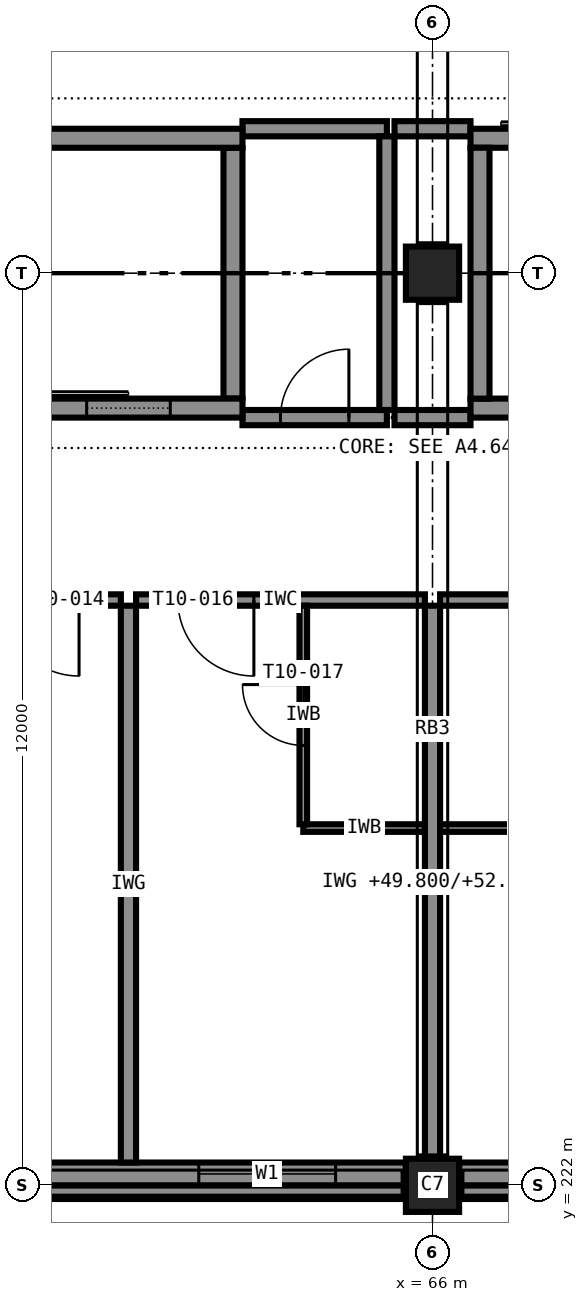
"""IFC4 building model, lengths in metres.
Left out: names, types, materials, properties, quantities, classifications, styles, units other than length and angle.
Written with IfcOpenShell. Run it as: python <this file> out.ifc"""

import sys

from ifc_helpers import new_model, si_unit, direction, frame, frame_2d, origin, origin_2d, place, context, subcontext, project, spatial, rectangle, extrude, element, fill, save


model = new_model("IFC4")
c1 = context("Model", 3, precision=1e-05, world=origin(), true_north=direction((0.0, 1.0)))
c2 = subcontext(c1, "Body", "Model", "MODEL_VIEW")
j1 = project(units=[si_unit("LENGTHUNIT", "METRE"), si_unit("PLANEANGLEUNIT", "RADIAN")], contexts=[c1])
p1 = place(None, origin())
s1 = spatial("IfcSite", under=j1, at=p1, CompositionType="ELEMENT")
p2 = place(p1, origin())
s2 = spatial("IfcBuilding", under=s1, at=p2, CompositionType="ELEMENT")
p3 = place(p2, frame((0.0, 0.0, 49.8)))
s3 = spatial("IfcBuildingStorey", under=s2, at=p3, CompositionType="ELEMENT", Elevation=49.8)
for number, where, z_axis, x_axis in (
    (1, (66.0, 222.0, 0.0), (0.0, 0.0, 1.0), (1.0, 0.0, 0.0)),
    (2, (66.0, 234.0, 0.0), (0.0, 0.0, 1.0), (1.0, 0.0, 0.0)),
):
    element("IfcColumn", number, at=place(p3, frame(where, z_axis=z_axis, x_axis=x_axis)), inside=s3, PredefinedType="COLUMN", context=c2, shape_type="SweptSolid", body=[
        extrude(rectangle(XDim=0.7, YDim=0.7, at=origin_2d()), origin(), (0.0, 0.0, 1.0), 3.6),
    ])
p4 = place(p3, frame((60.5, 232.225, 0.0), z_axis=(0.0, 0.0, 1.0), x_axis=(1.0, 0.0, 0.0)))
e3 = element("IfcWall", 3, at=p4, inside=s3, PredefinedType="SHEAR", context=c2, shape_type="SweptSolid", body=[
    extrude(rectangle(XDim=3.0, YDim=0.25, at=frame_2d((1.5, 0.0))), origin(), (0.0, 0.0, 1.0), 3.6),
])
p5 = place(p4, frame((0.95, 0.0, 0.0)))
e4 = element("IfcOpeningElement", 4, at=p5, cuts=e3, PredefinedType="OPENING", context=c2, shape_type="SweptSolid", body=[
    extrude(rectangle(XDim=1.1, YDim=2.1, at=frame_2d((0.55, 1.05))), frame((0.0, 0.135, 0.0), z_axis=(0.0, -1.0, 0.0), x_axis=(1.0, 0.0, 0.0)), (0.0, 0.0, 1.0), 0.27),
])
p6 = place(p3, frame((60.5, 235.775, 0.0), z_axis=(0.0, 0.0, 1.0), x_axis=(1.0, 0.0, 0.0)))
e5 = element("IfcWall", 5, at=p6, inside=s3, PredefinedType="SHEAR", context=c2, shape_type="SweptSolid", body=[
    extrude(rectangle(XDim=3.0, YDim=0.25, at=frame_2d((1.5, 0.0))), origin(), (0.0, 0.0, 1.0), 3.6),
])
p7 = place(p3, frame((63.375, 232.35, 0.0), z_axis=(0.0, 0.0, 1.0), x_axis=(0.0, 1.0, 0.0)))
e6 = element("IfcWall", 6, at=p7, inside=s3, PredefinedType="SHEAR", context=c2, shape_type="SweptSolid", body=[
    extrude(rectangle(XDim=3.3, YDim=0.25, at=frame_2d((1.65, 0.0))), origin(), (0.0, 0.0, 1.0), 3.6),
])
p8 = place(p3, frame((66.5, 232.225, 0.0), z_axis=(0.0, 0.0, 1.0), x_axis=(1.0, 0.0, 0.0)))
e7 = element("IfcWall", 7, at=p8, inside=s3, PredefinedType="SHEAR", context=c2, shape_type="SweptSolid", body=[
    extrude(rectangle(XDim=3.0, YDim=0.25, at=frame_2d((1.5, 0.0))), origin(), (0.0, 0.0, 1.0), 3.6),
])
p9 = place(p3, frame((66.5, 235.775, 0.0), z_axis=(0.0, 0.0, 1.0), x_axis=(1.0, 0.0, 0.0)))
e8 = element("IfcWall", 8, at=p9, inside=s3, PredefinedType="SHEAR", context=c2, shape_type="SweptSolid", body=[
    extrude(rectangle(XDim=3.0, YDim=0.25, at=frame_2d((1.5, 0.0))), origin(), (0.0, 0.0, 1.0), 3.6),
])
p10 = place(p9, frame((0.95, 0.0, 0.0)))
e9 = element("IfcOpeningElement", 9, at=p10, cuts=e8, PredefinedType="OPENING", context=c2, shape_type="SweptSolid", body=[
    extrude(rectangle(XDim=1.1, YDim=2.1, at=frame_2d((0.55, 1.05))), frame((0.0, 0.135, 0.0), z_axis=(0.0, -1.0, 0.0), x_axis=(1.0, 0.0, 0.0)), (0.0, 0.0, 1.0), 0.27),
])
p11 = place(p3, frame((66.625, 232.35, 0.0), z_axis=(0.0, 0.0, 1.0), x_axis=(0.0, 1.0, 0.0)))
e10 = element("IfcWall", 10, at=p11, inside=s3, PredefinedType="SHEAR", context=c2, shape_type="SweptSolid", body=[
    extrude(rectangle(XDim=3.3, YDim=0.25, at=frame_2d((1.65, 0.0))), origin(), (0.0, 0.0, 1.0), 3.6),
])
p12 = place(p3, frame((54.35, 222.15, 0.0), z_axis=(0.0, 0.0, 1.0), x_axis=(1.0, 0.0, 0.0)))
e11 = element("IfcWall", 11, at=p12, inside=s3, PredefinedType="STANDARD", context=c2, shape_type="SweptSolid", body=[
    extrude(rectangle(XDim=11.3, YDim=0.3, at=frame_2d((5.65, 0.0))), origin(), (0.0, 0.0, 1.0), 2.6),
])
p13 = place(p12, frame((0.925, 0.0, 0.85)))
e12 = element("IfcOpeningElement", 12, at=p13, cuts=e11, PredefinedType="OPENING", context=c2, shape_type="SweptSolid", body=[
    extrude(rectangle(XDim=1.8, YDim=1.75, at=frame_2d((0.9, 0.875))), frame((0.0, 0.16, 0.0), z_axis=(0.0, -1.0, 0.0), x_axis=(1.0, 0.0, 0.0)), (0.0, 0.0, 1.0), 0.32),
])
p14 = place(p12, frame((4.75, 0.0, 0.85)))
e13 = element("IfcOpeningElement", 13, at=p14, cuts=e11, PredefinedType="OPENING", context=c2, shape_type="SweptSolid", body=[
    extrude(rectangle(XDim=1.8, YDim=1.75, at=frame_2d((0.9, 0.875))), frame((0.0, 0.16, 0.0), z_axis=(0.0, -1.0, 0.0), x_axis=(1.0, 0.0, 0.0)), (0.0, 0.0, 1.0), 0.32),
])
p15 = place(p12, frame((8.575, 0.0, 0.85)))
e14 = element("IfcOpeningElement", 14, at=p15, cuts=e11, PredefinedType="OPENING", context=c2, shape_type="SweptSolid", body=[
    extrude(rectangle(XDim=1.8, YDim=1.75, at=frame_2d((0.9, 0.875))), frame((0.0, 0.16, 0.0), z_axis=(0.0, -1.0, 0.0), x_axis=(1.0, 0.0, 0.0)), (0.0, 0.0, 1.0), 0.32),
])
p16 = place(p3, frame((66.35, 222.15, 0.0), z_axis=(0.0, 0.0, 1.0), x_axis=(1.0, 0.0, 0.0)))
e15 = element("IfcWall", 15, at=p16, inside=s3, PredefinedType="STANDARD", context=c2, shape_type="SweptSolid", body=[
    extrude(rectangle(XDim=11.3, YDim=0.3, at=frame_2d((5.65, 0.0))), origin(), (0.0, 0.0, 1.0), 2.6),
])
p17 = place(p16, frame((1.925, 0.0, 0.85)))
e16 = element("IfcOpeningElement", 16, at=p17, cuts=e15, PredefinedType="OPENING", context=c2, shape_type="SweptSolid", body=[
    extrude(rectangle(XDim=1.8, YDim=1.75, at=frame_2d((0.9, 0.875))), frame((0.0, 0.16, 0.0), z_axis=(0.0, -1.0, 0.0), x_axis=(1.0, 0.0, 0.0)), (0.0, 0.0, 1.0), 0.32),
])
p18 = place(p16, frame((7.575, 0.0, 0.85)))
e17 = element("IfcOpeningElement", 17, at=p18, cuts=e15, PredefinedType="OPENING", context=c2, shape_type="SweptSolid", body=[
    extrude(rectangle(XDim=1.8, YDim=1.75, at=frame_2d((0.9, 0.875))), frame((0.0, 0.16, 0.0), z_axis=(0.0, -1.0, 0.0), x_axis=(1.0, 0.0, 0.0)), (0.0, 0.0, 1.0), 0.32),
])
for number, where, z_axis, x_axis in (
    (18, (54.35, 221.925, 3.4), (0.0, 0.0, 1.0), (1.0, 0.0, 0.0)),
    (19, (66.35, 221.925, 3.4), (0.0, 0.0, 1.0), (1.0, 0.0, 0.0)),
):
    element("IfcWall", number, at=place(p3, frame(where, z_axis=z_axis, x_axis=x_axis)), inside=s3, PredefinedType="STANDARD", context=c2, shape_type="SweptSolid", body=[
        extrude(rectangle(XDim=11.3, YDim=0.15, at=frame_2d((5.65, 0.0))), origin(), (0.0, 0.0, 1.0), 0.2),
    ])
p19 = place(p3, frame((63.5, 232.1, 0.0), z_axis=(0.0, 0.0, 1.0), x_axis=(1.0, 0.0, 0.0)))
e20 = element("IfcWall", 20, at=p19, inside=s3, PredefinedType="PARTITIONING", context=c2, shape_type="SweptSolid", body=[
    extrude(rectangle(XDim=1.9, YDim=0.2, at=frame_2d((0.95, 0.0))), origin(), (0.0, 0.0, 1.0), 3.4),
])
p20 = place(p19, frame((0.5, 0.0, 0.0)))
e21 = element("IfcOpeningElement", 21, at=p20, cuts=e20, PredefinedType="OPENING", context=c2, shape_type="SweptSolid", body=[
    extrude(rectangle(XDim=0.9, YDim=2.1, at=frame_2d((0.45, 1.05))), frame((0.0, 0.11, 0.0), z_axis=(0.0, -1.0, 0.0), x_axis=(1.0, 0.0, 0.0)), (0.0, 0.0, 1.0), 0.22),
])
p21 = place(p3, frame((65.5, 232.1, 0.0), z_axis=(0.0, 0.0, 1.0), x_axis=(1.0, 0.0, 0.0)))
e22 = element("IfcWall", 22, at=p21, inside=s3, PredefinedType="PARTITIONING", context=c2, shape_type="SweptSolid", body=[
    extrude(rectangle(XDim=1.0, YDim=0.2, at=frame_2d((0.5, 0.0))), origin(), (0.0, 0.0, 1.0), 3.4),
])
p22 = place(p3, frame((63.5, 235.9, 0.0), z_axis=(0.0, 0.0, 1.0), x_axis=(1.0, 0.0, 0.0)))
e23 = element("IfcWall", 23, at=p22, inside=s3, PredefinedType="PARTITIONING", context=c2, shape_type="SweptSolid", body=[
    extrude(rectangle(XDim=1.9, YDim=0.2, at=frame_2d((0.95, 0.0))), origin(), (0.0, 0.0, 1.0), 3.4),
])
p23 = place(p3, frame((65.5, 235.9, 0.0), z_axis=(0.0, 0.0, 1.0), x_axis=(1.0, 0.0, 0.0)))
e24 = element("IfcWall", 24, at=p23, inside=s3, PredefinedType="PARTITIONING", context=c2, shape_type="SweptSolid", body=[
    extrude(rectangle(XDim=1.0, YDim=0.2, at=frame_2d((0.5, 0.0))), origin(), (0.0, 0.0, 1.0), 3.4),
])
p24 = place(p3, frame((65.4, 232.2, 0.0), z_axis=(0.0, 0.0, 1.0), x_axis=(0.0, 1.0, 0.0)))
e25 = element("IfcWall", 25, at=p24, inside=s3, PredefinedType="PARTITIONING", context=c2, shape_type="SweptSolid", body=[
    extrude(rectangle(XDim=3.6, YDim=0.2, at=frame_2d((1.8, 0.0))), origin(), (0.0, 0.0, 1.0), 3.4),
])
p25 = place(p3, frame((61.9, 229.7, 0.0), z_axis=(0.0, 0.0, 1.0), x_axis=(-1.0, 0.0, 0.0)))
e26 = element("IfcWall", 26, at=p25, inside=s3, PredefinedType="PARTITIONING", context=c2, shape_type="SweptSolid", body=[
    extrude(rectangle(XDim=3.8, YDim=0.15, at=frame_2d((1.9, 0.0))), origin(), (0.0, 0.0, 1.0), 3.4),
])
p26 = place(p25, frame((0.55, 0.0, 0.0)))
e27 = element("IfcOpeningElement", 27, at=p26, cuts=e26, PredefinedType="OPENING", context=c2, shape_type="SweptSolid", body=[
    extrude(rectangle(XDim=1.0, YDim=2.1, at=frame_2d((0.5, 1.05))), frame((0.0, 0.085, 0.0), z_axis=(0.0, -1.0, 0.0), x_axis=(1.0, 0.0, 0.0)), (0.0, 0.0, 1.0), 0.17),
])
p27 = place(p3, frame((65.9, 229.7, 0.0), z_axis=(0.0, 0.0, 1.0), x_axis=(-1.0, 0.0, 0.0)))
e28 = element("IfcWall", 28, at=p27, inside=s3, PredefinedType="PARTITIONING", context=c2, shape_type="SweptSolid", body=[
    extrude(rectangle(XDim=3.8, YDim=0.15, at=frame_2d((1.9, 0.0))), origin(), (0.0, 0.0, 1.0), 3.4),
])
p28 = place(p27, frame((2.25, 0.0, 0.0)))
e29 = element("IfcOpeningElement", 29, at=p28, cuts=e28, PredefinedType="OPENING", context=c2, shape_type="SweptSolid", body=[
    extrude(rectangle(XDim=1.0, YDim=2.1, at=frame_2d((0.5, 1.05))), frame((0.0, 0.085, 0.0), z_axis=(0.0, -1.0, 0.0), x_axis=(1.0, 0.0, 0.0)), (0.0, 0.0, 1.0), 0.17),
])
p29 = place(p3, frame((64.3, 226.7, 0.0), z_axis=(0.0, 0.0, 1.0), x_axis=(1.0, 0.0, 0.0)))
e30 = element("IfcWall", 30, at=p29, inside=s3, PredefinedType="PARTITIONING", context=c2, shape_type="SweptSolid", body=[
    extrude(rectangle(XDim=1.6, YDim=0.1, at=frame_2d((0.8, 0.0))), origin(), (0.0, 0.0, 1.0), 3.4),
])
p30 = place(p3, frame((64.3, 226.75, 0.0), z_axis=(0.0, 0.0, 1.0), x_axis=(0.0, 1.0, 0.0)))
e31 = element("IfcWall", 31, at=p30, inside=s3, PredefinedType="PARTITIONING", context=c2, shape_type="SweptSolid", body=[
    extrude(rectangle(XDim=2.875, YDim=0.1, at=frame_2d((1.438, 0.0))), origin(), (0.0, 0.0, 1.0), 3.4),
])
p31 = place(p30, frame((1.038, 0.0, 0.0)))
e32 = element("IfcOpeningElement", 32, at=p31, cuts=e31, PredefinedType="OPENING", context=c2, shape_type="SweptSolid", body=[
    extrude(rectangle(XDim=0.8, YDim=2.1, at=frame_2d((0.4, 1.05))), frame((0.0, 0.06, 0.0), z_axis=(0.0, -1.0, 0.0), x_axis=(1.0, 0.0, 0.0)), (0.0, 0.0, 1.0), 0.12),
])
p32 = place(p3, frame((71.9, 229.7, 0.0), z_axis=(0.0, 0.0, 1.0), x_axis=(-1.0, 0.0, 0.0)))
e33 = element("IfcWall", 33, at=p32, inside=s3, PredefinedType="PARTITIONING", context=c2, shape_type="SweptSolid", body=[
    extrude(rectangle(XDim=5.8, YDim=0.15, at=frame_2d((2.9, 0.0))), origin(), (0.0, 0.0, 1.0), 3.4),
])
p33 = place(p32, frame((1.2, 0.0, 0.0)))
e34 = element("IfcOpeningElement", 34, at=p33, cuts=e33, PredefinedType="OPENING", context=c2, shape_type="SweptSolid", body=[
    extrude(rectangle(XDim=1.0, YDim=2.1, at=frame_2d((0.5, 1.05))), frame((0.0, 0.085, 0.0), z_axis=(0.0, -1.0, 0.0), x_axis=(1.0, 0.0, 0.0)), (0.0, 0.0, 1.0), 0.17),
])
p34 = place(p3, frame((66.1, 226.7, 0.0), z_axis=(0.0, 0.0, 1.0), x_axis=(1.0, 0.0, 0.0)))
e35 = element("IfcWall", 35, at=p34, inside=s3, PredefinedType="PARTITIONING", context=c2, shape_type="SweptSolid", body=[
    extrude(rectangle(XDim=2.3, YDim=0.1, at=frame_2d((1.15, 0.0))), origin(), (0.0, 0.0, 1.0), 3.4),
])
p35 = place(p3, frame((62.0, 222.3, 0.0), z_axis=(0.0, 0.0, 1.0), x_axis=(0.0, 1.0, 0.0)))
e36 = element("IfcWall", 36, at=p35, inside=s3, PredefinedType="PARTITIONING", context=c2, shape_type="SweptSolid", body=[
    extrude(rectangle(XDim=7.325, YDim=0.2, at=frame_2d((3.663, 0.0))), origin(), (0.0, 0.0, 1.0), 3.4),
])
p36 = place(p3, frame((66.0, 222.35, 0.0), z_axis=(0.0, 0.0, 1.0), x_axis=(0.0, 1.0, 0.0)))
e37 = element("IfcWall", 37, at=p36, inside=s3, PredefinedType="PARTITIONING", context=c2, shape_type="SweptSolid", body=[
    extrude(rectangle(XDim=7.275, YDim=0.2, at=frame_2d((3.637, 0.0))), origin(), (0.0, 0.0, 1.0), 2.6),
])
p37 = place(p15, origin())
e38 = element("IfcWindow", 38, at=p37, inside=s3, PartitioningType="SINGLE_PANEL", PredefinedType="WINDOW", context=c2, shape_type="SweptSolid", body=[
    extrude(rectangle(XDim=1.8, YDim=1.75, at=frame_2d((0.9, 0.875))), frame((0.0, 0.03, 0.0), z_axis=(0.0, -1.0, 0.0), x_axis=(1.0, 0.0, 0.0)), (0.0, 0.0, 1.0), 0.06),
])
fill(e14, e38)
p38 = place(p20, origin())
e39 = element("IfcDoor", 39, at=p38, inside=s3, OperationType="SINGLE_SWING_RIGHT", PredefinedType="DOOR", context=c2, shape_type="SweptSolid", body=[
    extrude(rectangle(XDim=0.9, YDim=2.1, at=frame_2d((0.45, 1.05))), frame((0.0, 0.025, 0.0), z_axis=(0.0, -1.0, 0.0), x_axis=(1.0, 0.0, 0.0)), (0.0, 0.0, 1.0), 0.05),
])
fill(e21, e39)
p39 = place(p26, origin())
e40 = element("IfcDoor", 40, at=p39, inside=s3, OperationType="SINGLE_SWING_LEFT", PredefinedType="DOOR", context=c2, shape_type="SweptSolid", body=[
    extrude(rectangle(XDim=1.0, YDim=2.1, at=frame_2d((0.5, 1.05))), frame((0.0, 0.025, 0.0), z_axis=(0.0, -1.0, 0.0), x_axis=(1.0, 0.0, 0.0)), (0.0, 0.0, 1.0), 0.05),
])
fill(e27, e40)
p40 = place(p28, origin())
e41 = element("IfcDoor", 41, at=p40, inside=s3, OperationType="SINGLE_SWING_LEFT", PredefinedType="DOOR", context=c2, shape_type="SweptSolid", body=[
    extrude(rectangle(XDim=1.0, YDim=2.1, at=frame_2d((0.5, 1.05))), frame((0.0, 0.025, 0.0), z_axis=(0.0, -1.0, 0.0), x_axis=(1.0, 0.0, 0.0)), (0.0, 0.0, 1.0), 0.05),
])
fill(e29, e41)
p41 = place(p31, origin())
e42 = element("IfcDoor", 42, at=p41, inside=s3, OperationType="SINGLE_SWING_RIGHT", PredefinedType="DOOR", context=c2, shape_type="SweptSolid", body=[
    extrude(rectangle(XDim=0.8, YDim=2.1, at=frame_2d((0.4, 1.05))), frame((0.0, 0.025, 0.0), z_axis=(0.0, -1.0, 0.0), x_axis=(1.0, 0.0, 0.0)), (0.0, 0.0, 1.0), 0.05),
])
fill(e32, e42)
p42 = place(p5, origin())
e43 = element("IfcDoor", 43, at=p42, inside=s3, OperationType="SLIDING_TO_LEFT", PredefinedType="DOOR", context=c2, shape_type="SweptSolid", body=[
    extrude(rectangle(XDim=1.1, YDim=2.1, at=frame_2d((0.55, 1.05))), frame((0.0, 0.025, 0.0), z_axis=(0.0, -1.0, 0.0), x_axis=(1.0, 0.0, 0.0)), (0.0, 0.0, 1.0), 0.05),
])
fill(e4, e43)
save(model, sys.argv[1])
